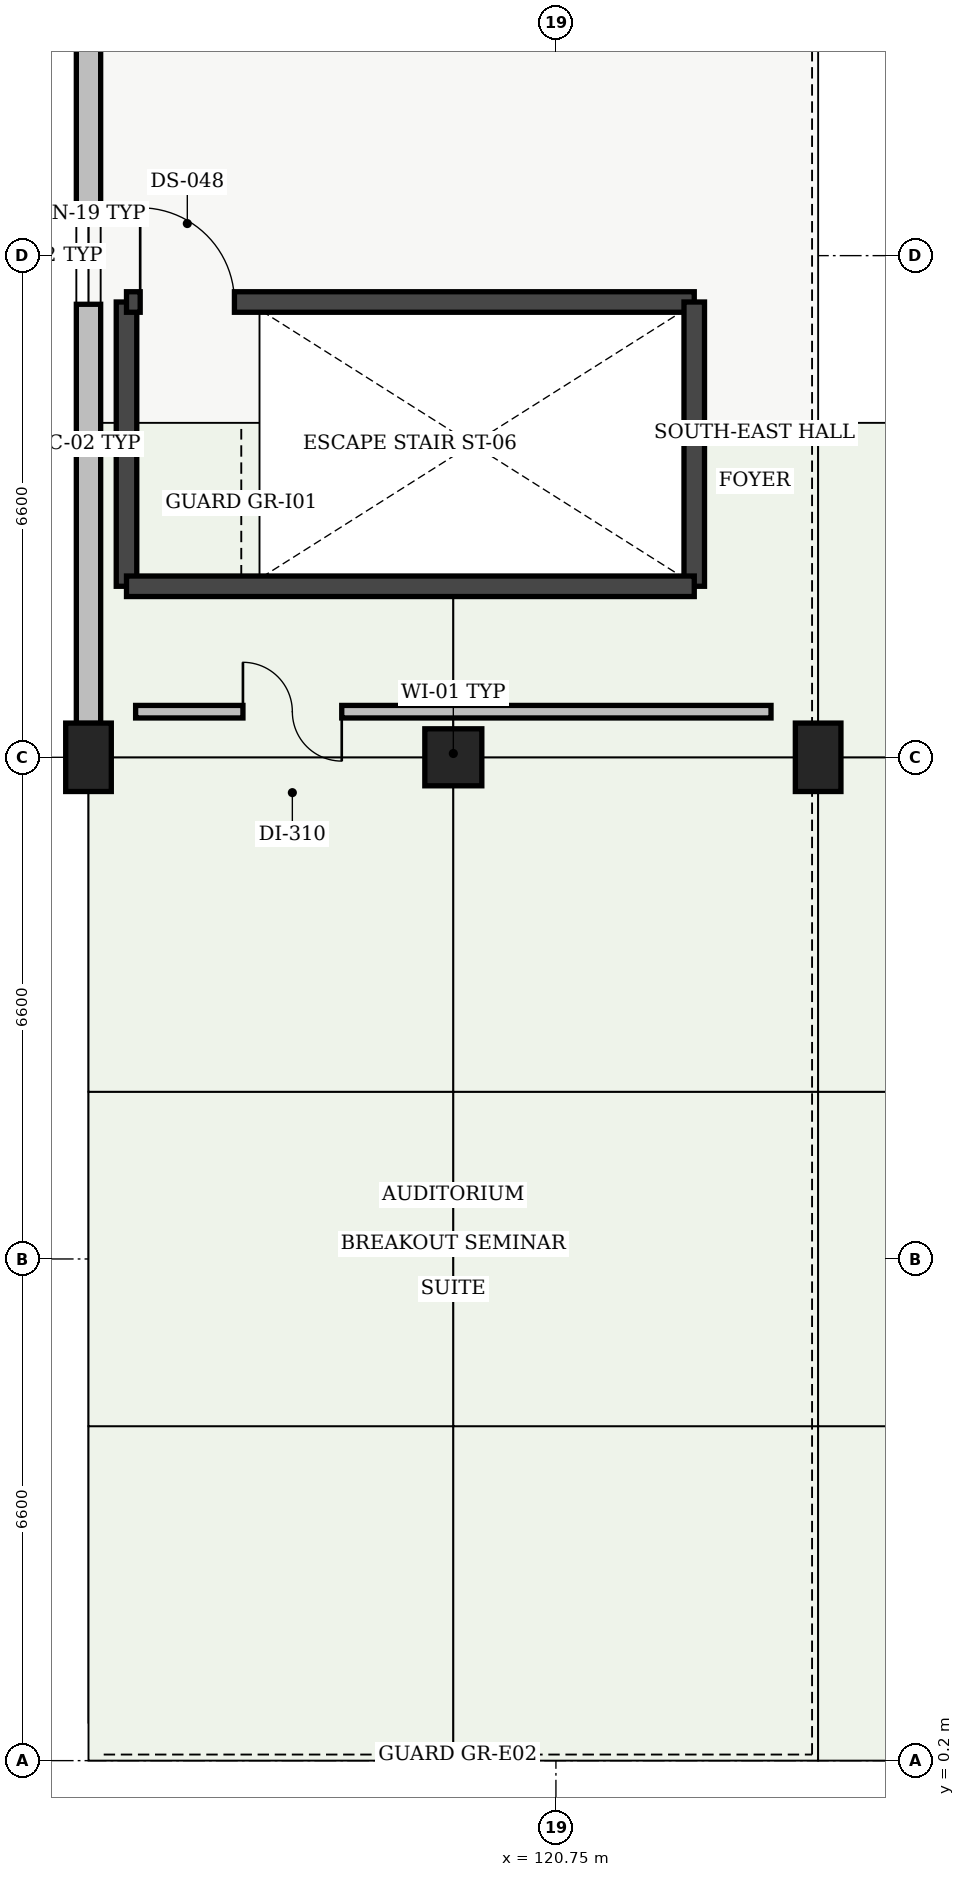
"""IFC4 building model, lengths in metres.
Left out: names, types, materials, properties, quantities, classifications, styles, units other than length and angle.
Written with IfcOpenShell. Run it as: python <this file> out.ifc"""

import sys

from ifc_helpers import new_model, si_unit, direction, frame, frame_2d, origin, origin_2d, place, context, subcontext, project, spatial, rectangle, circle, extrude, element, fill, save


model = new_model("IFC4")
c1 = context("Model", 3, precision=1e-05, world=origin(), true_north=direction((0.0, 1.0)))
c2 = subcontext(c1, "Body", "Model", "MODEL_VIEW")
j1 = project(units=[si_unit("LENGTHUNIT", "METRE"), si_unit("PLANEANGLEUNIT", "RADIAN")], contexts=[c1])
p1 = place(None, origin())
s1 = spatial("IfcSite", under=j1, at=p1, CompositionType="ELEMENT")
p2 = place(p1, origin())
s2 = spatial("IfcBuilding", under=s1, at=p2, CompositionType="ELEMENT")
p3 = place(p2, frame((0.0, 0.0, 9.6)))
s3 = spatial("IfcBuildingStorey", under=s2, at=p3, CompositionType="ELEMENT", Elevation=9.6)
p4 = place(p3, frame((114.6, 13.4, 0.0), z_axis=(0.0, 0.0, 1.0), x_axis=(1.0, 0.0, 0.0)))
e1 = element("IfcColumn", 1, at=p4, inside=s3, PredefinedType="COLUMN", context=c2, shape_type="SweptSolid", body=[
    extrude(rectangle(XDim=0.6, YDim=0.9, at=origin_2d()), origin(), (0.0, 0.0, 1.0), 4.539),
])
p5 = place(p3, frame((119.4, 13.4, 0.0), z_axis=(0.0, 0.0, 1.0), x_axis=(1.0, 0.0, 0.0)))
e2 = element("IfcColumn", 2, at=p5, inside=s3, PredefinedType="COLUMN", context=c2, shape_type="SweptSolid", body=[
    extrude(circle(Radius=0.375, at=origin_2d()), origin(), (0.0, 0.0, 1.0), 4.539),
])
p6 = place(p3, frame((124.2, 13.4, 0.0), z_axis=(0.0, 0.0, 1.0), x_axis=(1.0, 0.0, 0.0)))
e3 = element("IfcColumn", 3, at=p6, inside=s3, PredefinedType="COLUMN", context=c2, shape_type="SweptSolid", body=[
    extrude(rectangle(XDim=0.6, YDim=0.9, at=origin_2d()), origin(), (0.0, 0.0, 1.0), 4.539),
])
p7 = place(p3, frame((114.6, 13.845, 0.0), z_axis=(0.0, 0.0, 1.0), x_axis=(0.0, 1.0, 0.0)))
e4 = element("IfcWall", 4, at=p7, inside=s3, PredefinedType="SOLIDWALL", context=c2, shape_type="SweptSolid", body=[
    extrude(rectangle(XDim=12.31, YDim=0.32, at=frame_2d((6.155, 0.0))), origin(), (0.0, 0.0, 1.0), 4.28),
])
p8 = place(p7, frame((5.515, 0.0, 0.95)))
e5 = element("IfcOpeningElement", 5, at=p8, cuts=e4, PredefinedType="OPENING", context=c2, shape_type="SweptSolid", body=[
    extrude(rectangle(XDim=1.28, YDim=1.42, at=frame_2d((0.64, 0.71))), frame((0.0, 0.16, 0.0), z_axis=(0.0, -1.0, 0.0), x_axis=(1.0, 0.0, 0.0)), (0.0, 0.0, 1.0), 0.32),
])
p9 = place(p3, frame((115.1, 15.65, 0.0), z_axis=(0.0, 0.0, 1.0), x_axis=(0.0, 1.0, 0.0)))
e6 = element("IfcWall", 6, at=p9, inside=s3, PredefinedType="SHEAR", context=c2, shape_type="SweptSolid", body=[
    extrude(rectangle(XDim=3.74, YDim=0.27, at=frame_2d((1.87, 0.0))), origin(), (0.0, 0.0, 1.0), 4.28),
])
p10 = place(p3, frame((115.1, 19.39, 0.0), z_axis=(0.0, 0.0, 1.0), x_axis=(1.0, 0.0, 0.0)))
e7 = element("IfcWall", 7, at=p10, inside=s3, PredefinedType="SHEAR", context=c2, shape_type="SweptSolid", body=[
    extrude(rectangle(XDim=7.47, YDim=0.27, at=frame_2d((3.735, 0.0))), origin(), (0.0, 0.0, 1.0), 4.28),
])
p11 = place(p10, frame((0.18, 0.0, 0.0)))
e8 = element("IfcOpeningElement", 8, at=p11, cuts=e7, PredefinedType="OPENING", context=c2, shape_type="SweptSolid", body=[
    extrude(rectangle(XDim=1.24, YDim=2.15, at=frame_2d((0.62, 1.075))), frame((0.0, 0.135, 0.0), z_axis=(0.0, -1.0, 0.0), x_axis=(1.0, 0.0, 0.0)), (0.0, 0.0, 1.0), 0.27),
])
p12 = place(p3, frame((122.57, 19.39, 0.0), z_axis=(0.0, 0.0, 1.0), x_axis=(0.0, -1.0, 0.0)))
e9 = element("IfcWall", 9, at=p12, inside=s3, PredefinedType="SHEAR", context=c2, shape_type="SweptSolid", body=[
    extrude(rectangle(XDim=3.74, YDim=0.27, at=frame_2d((1.87, 0.0))), origin(), (0.0, 0.0, 1.0), 4.28),
])
p13 = place(p3, frame((122.57, 15.65, 0.0), z_axis=(0.0, 0.0, 1.0), x_axis=(-1.0, 0.0, 0.0)))
e10 = element("IfcWall", 10, at=p13, inside=s3, PredefinedType="SHEAR", context=c2, shape_type="SweptSolid", body=[
    extrude(rectangle(XDim=7.47, YDim=0.27, at=frame_2d((3.735, 0.0))), origin(), (0.0, 0.0, 1.0), 4.28),
])
p14 = place(p3, frame((123.58, 14.0, 0.0), z_axis=(0.0, 0.0, 1.0), x_axis=(-1.0, 0.0, 0.0)))
e11 = element("IfcWall", 11, at=p14, inside=s3, PredefinedType="PARTITIONING", context=c2, shape_type="SweptSolid", body=[
    extrude(rectangle(XDim=8.36, YDim=0.165, at=frame_2d((4.18, 0.0))), origin(), (0.0, 0.0, 1.0), 3.2),
])
p15 = place(p14, frame((5.648, 0.0, 0.0)))
e12 = element("IfcOpeningElement", 12, at=p15, cuts=e11, PredefinedType="OPENING", context=c2, shape_type="SweptSolid", body=[
    extrude(rectangle(XDim=1.3, YDim=2.18, at=frame_2d((0.65, 1.09))), frame((0.0, 0.083, 0.0), z_axis=(0.0, -1.0, 0.0), x_axis=(1.0, 0.0, 0.0)), (0.0, 0.0, 1.0), 0.165),
])
p16 = place(p8, origin())
e13 = element("IfcWindow", 13, at=p16, inside=s3, PartitioningType="SINGLE_PANEL", PredefinedType="WINDOW", context=c2, shape_type="SweptSolid", body=[
    extrude(rectangle(XDim=1.28, YDim=1.42, at=frame_2d((0.64, 0.71))), frame((0.0, 0.03, 0.0), z_axis=(0.0, -1.0, 0.0), x_axis=(1.0, 0.0, 0.0)), (0.0, 0.0, 1.0), 0.06),
])
fill(e5, e13)
p17 = place(p11, origin())
e14 = element("IfcDoor", 14, at=p17, inside=s3, OperationType="SINGLE_SWING_LEFT", PredefinedType="DOOR", context=c2, shape_type="SweptSolid", body=[
    extrude(rectangle(XDim=1.24, YDim=2.15, at=frame_2d((0.62, 1.075))), frame((0.0, 0.025, 0.0), z_axis=(0.0, -1.0, 0.0), x_axis=(1.0, 0.0, 0.0)), (0.0, 0.0, 1.0), 0.05),
])
fill(e8, e14)
p18 = place(p15, origin())
e15 = element("IfcDoor", 15, at=p18, inside=s3, OperationType="DOUBLE_DOOR_SINGLE_SWING", PredefinedType="DOOR", context=c2, shape_type="SweptSolid", body=[
    extrude(rectangle(XDim=1.3, YDim=2.18, at=frame_2d((0.65, 1.09))), frame((0.0, 0.025, 0.0), z_axis=(0.0, -1.0, 0.0), x_axis=(1.0, 0.0, 0.0)), (0.0, 0.0, 1.0), 0.05),
])
fill(e12, e15)
save(model, sys.argv[1])
